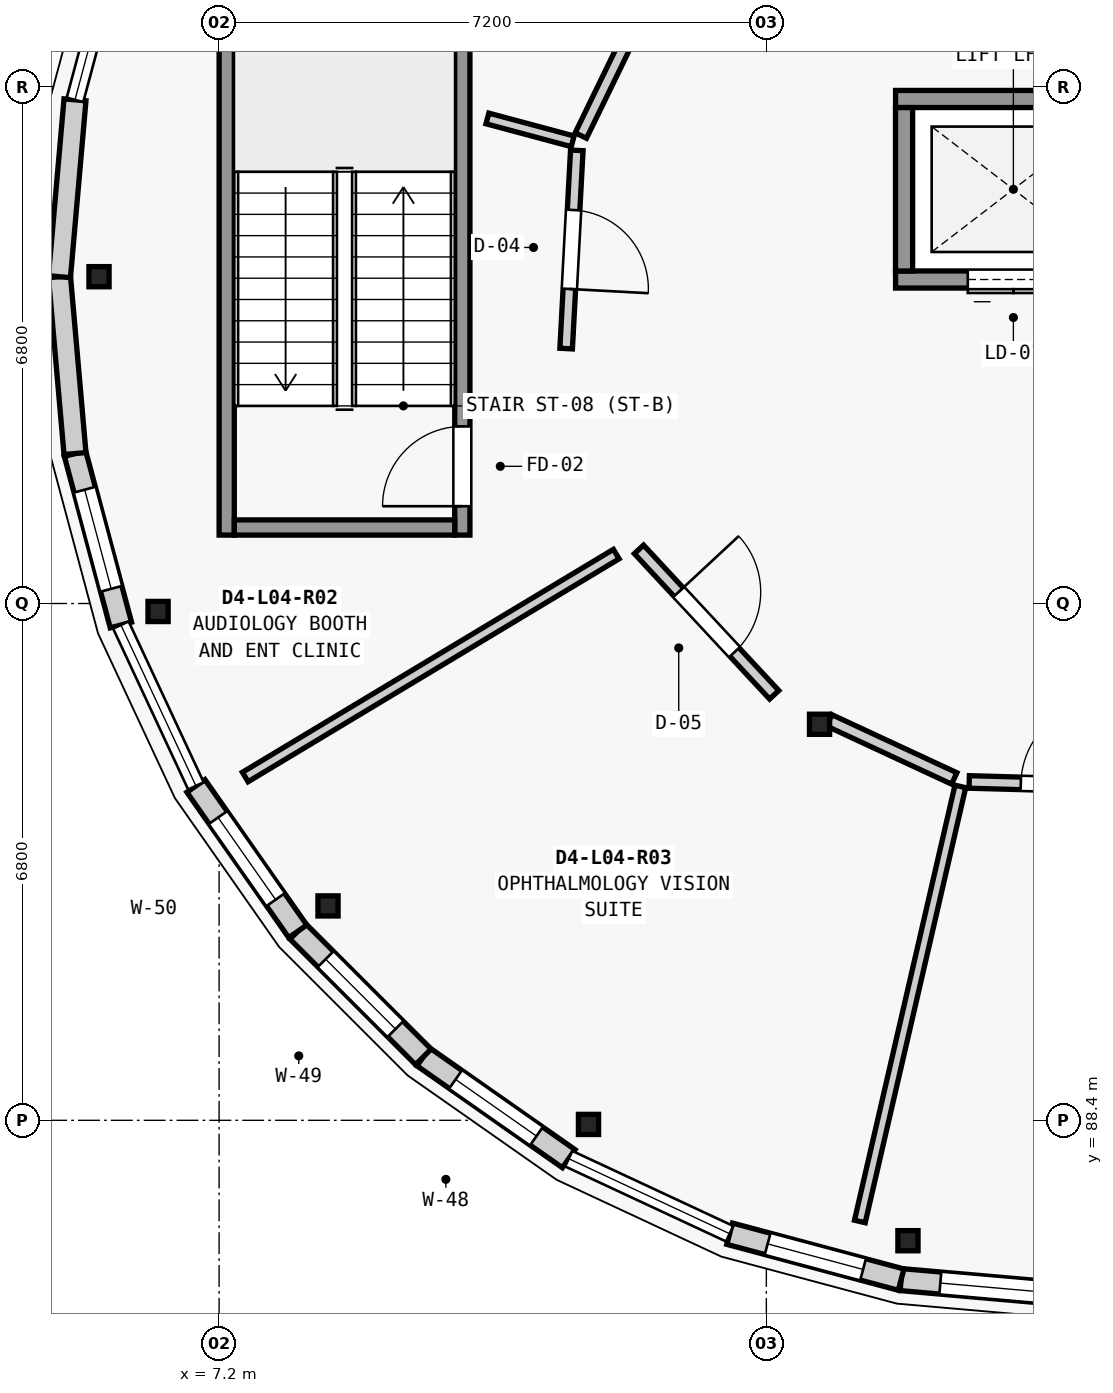
"""IFC4 building model, lengths in metres.
Left out: names, types, materials, properties, quantities, classifications, styles, units other than length and angle.
Written with IfcOpenShell. Run it as: python <this file> out.ifc"""

import sys

from ifc_helpers import new_model, si_unit, direction, frame, frame_2d, origin, origin_2d, place, context, subcontext, project, spatial, rectangle, extrude, element, fill, save


model = new_model("IFC4")
c1 = context("Model", 3, precision=1e-05, world=origin(), true_north=direction((0.0, 1.0)))
c2 = subcontext(c1, "Body", "Model", "MODEL_VIEW")
j1 = project(units=[si_unit("LENGTHUNIT", "METRE"), si_unit("PLANEANGLEUNIT", "RADIAN")], contexts=[c1])
p1 = place(None, origin())
s1 = spatial("IfcSite", under=j1, at=p1, CompositionType="ELEMENT")
p2 = place(p1, origin())
s2 = spatial("IfcBuilding", under=s1, at=p2, CompositionType="ELEMENT")
p3 = place(p2, frame((0.0, 0.0, 17.15)))
s3 = spatial("IfcBuildingStorey", under=s2, at=p3, CompositionType="ELEMENT", Elevation=17.15)
for number, where, z_axis, x_axis in (
    (1, (5.62, 99.5, 0.0), (0.0, 0.0, 1.0), (1.0, 0.0, 0.0)),
    (2, (6.397, 95.095, 0.0), (0.0, 0.0, 1.0), (1.0, 0.0, 0.0)),
    (3, (8.633, 91.221, 0.0), (0.0, 0.0, 1.0), (1.0, 0.0, 0.0)),
    (4, (12.06, 88.346, 0.0), (0.0, 0.0, 1.0), (1.0, 0.0, 0.0)),
    (5, (16.263, 86.816, 0.0), (0.0, 0.0, 1.0), (1.0, 0.0, 0.0)),
    (6, (15.1, 93.611, 0.0), (0.0, 0.0, 1.0), (1.0, 0.0, 0.0)),
):
    element("IfcColumn", number, at=place(p3, frame(where, z_axis=z_axis, x_axis=x_axis)), inside=s3, PredefinedType="COLUMN", context=c2, shape_type="SweptSolid", body=[
        extrude(rectangle(XDim=0.265, YDim=0.265, at=origin_2d()), origin(), (0.0, 0.0, 1.0), 4.2),
    ])
p4 = place(p3, frame((18.5, 86.1, 0.0), z_axis=(0.0, 0.0, 1.0), x_axis=(-0.996184295282, 0.087274565792, 0.0)))
e7 = element("IfcWall", 7, at=p4, inside=s3, PredefinedType="ELEMENTEDWALL", context=c2, shape_type="SweptSolid", body=[
    extrude(rectangle(XDim=2.336, YDim=0.29, at=frame_2d((1.168, 0.0))), origin(), (0.0, 0.0, 1.0), 3.369),
])
p5 = place(p4, frame((0.518, 0.0, 0.85)))
e8 = element("IfcOpeningElement", 8, at=p5, cuts=e7, PredefinedType="OPENING", context=c2, shape_type="SweptSolid", body=[
    extrude(rectangle(XDim=1.3, YDim=1.4, at=frame_2d((0.65, 0.7))), frame((0.0, 0.155, 0.0), z_axis=(0.0, -1.0, 0.0), x_axis=(1.0, 0.0, 0.0)), (0.0, 0.0, 1.0), 0.31),
])
p6 = place(p3, frame((16.173, 86.304, 0.0), z_axis=(0.0, 0.0, 1.0), x_axis=(-0.965981166673, 0.258612423585, 0.0)))
e9 = element("IfcWall", 9, at=p6, inside=s3, PredefinedType="ELEMENTEDWALL", context=c2, shape_type="SweptSolid", body=[
    extrude(rectangle(XDim=2.335, YDim=0.29, at=frame_2d((1.168, 0.0))), origin(), (0.0, 0.0, 1.0), 3.369),
])
p7 = place(p6, frame((0.518, 0.0, 0.85)))
e10 = element("IfcOpeningElement", 10, at=p7, cuts=e9, PredefinedType="OPENING", context=c2, shape_type="SweptSolid", body=[
    extrude(rectangle(XDim=1.3, YDim=1.7, at=frame_2d((0.65, 0.85))), frame((0.0, 0.155, 0.0), z_axis=(0.0, -1.0, 0.0), x_axis=(1.0, 0.0, 0.0)), (0.0, 0.0, 1.0), 0.31),
])
p8 = place(p3, frame((11.8, 87.895, 0.0), z_axis=(0.0, 0.0, 1.0), x_axis=(-0.819045278347, 0.573728883722, 0.0)))
e11 = element("IfcWall", 11, at=p8, inside=s3, PredefinedType="ELEMENTEDWALL", context=c2, shape_type="SweptSolid", body=[
    extrude(rectangle(XDim=2.336, YDim=0.29, at=frame_2d((1.168, 0.0))), origin(), (0.0, 0.0, 1.0), 3.369),
])
p9 = place(p8, frame((0.518, 0.0, 0.85)))
e12 = element("IfcOpeningElement", 12, at=p9, cuts=e11, PredefinedType="OPENING", context=c2, shape_type="SweptSolid", body=[
    extrude(rectangle(XDim=1.3, YDim=2.0, at=frame_2d((0.65, 1.0))), frame((0.0, 0.155, 0.0), z_axis=(0.0, -1.0, 0.0), x_axis=(1.0, 0.0, 0.0)), (0.0, 0.0, 1.0), 0.31),
])
p10 = place(p3, frame((9.887, 89.235, 0.0), z_axis=(0.0, 0.0, 1.0), x_axis=(-0.707106781187, 0.707106781187, 0.0)))
e13 = element("IfcWall", 13, at=p10, inside=s3, PredefinedType="ELEMENTEDWALL", context=c2, shape_type="SweptSolid", body=[
    extrude(rectangle(XDim=2.336, YDim=0.29, at=frame_2d((1.168, 0.0))), origin(), (0.0, 0.0, 1.0), 3.369),
])
p11 = place(p10, frame((0.518, 0.0, 0.85)))
e14 = element("IfcOpeningElement", 14, at=p11, cuts=e13, PredefinedType="OPENING", context=c2, shape_type="SweptSolid", body=[
    extrude(rectangle(XDim=1.3, YDim=2.3, at=frame_2d((0.65, 1.15))), frame((0.0, 0.155, 0.0), z_axis=(0.0, -1.0, 0.0), x_axis=(1.0, 0.0, 0.0)), (0.0, 0.0, 1.0), 0.31),
])
p12 = place(p3, frame((8.235, 90.887, 0.0), z_axis=(0.0, 0.0, 1.0), x_axis=(-0.573728883722, 0.819045278347, 0.0)))
e15 = element("IfcWall", 15, at=p12, inside=s3, PredefinedType="ELEMENTEDWALL", context=c2, shape_type="SweptSolid", body=[
    extrude(rectangle(XDim=2.336, YDim=0.29, at=frame_2d((1.168, 0.0))), origin(), (0.0, 0.0, 1.0), 3.369),
])
p13 = place(p12, frame((0.508, 0.0, 0.85)))
e16 = element("IfcOpeningElement", 16, at=p13, cuts=e15, PredefinedType="OPENING", context=c2, shape_type="SweptSolid", body=[
    extrude(rectangle(XDim=1.32, YDim=1.55, at=frame_2d((0.66, 0.775))), frame((0.0, 0.155, 0.0), z_axis=(0.0, -1.0, 0.0), x_axis=(1.0, 0.0, 0.0)), (0.0, 0.0, 1.0), 0.31),
])
p14 = place(p3, frame((5.908, 94.917, 0.0), z_axis=(0.0, 0.0, 1.0), x_axis=(-0.258612423585, 0.965981166673, 0.0)))
e17 = element("IfcWall", 17, at=p14, inside=s3, PredefinedType="ELEMENTEDWALL", context=c2, shape_type="SweptSolid", body=[
    extrude(rectangle(XDim=2.335, YDim=0.29, at=frame_2d((1.168, 0.0))), origin(), (0.0, 0.0, 1.0), 3.369),
])
p15 = place(p14, frame((0.493, 0.0, 0.85)))
e18 = element("IfcOpeningElement", 18, at=p15, cuts=e17, PredefinedType="OPENING", context=c2, shape_type="SweptSolid", body=[
    extrude(rectangle(XDim=1.35, YDim=1.55, at=frame_2d((0.675, 0.775))), frame((0.0, 0.155, 0.0), z_axis=(0.0, -1.0, 0.0), x_axis=(1.0, 0.0, 0.0)), (0.0, 0.0, 1.0), 0.31),
])
for number, where, z_axis, x_axis in (
    (19, (5.304, 97.173, 0.0), (0.0, 0.0, 1.0), (-0.087, 0.996, 0.0)),
    (20, (5.1, 99.5, 0.0), (0.0, 0.0, 1.0), (0.087, 0.996, 0.0)),
):
    element("IfcWall", number, at=place(p3, frame(where, z_axis=z_axis, x_axis=x_axis)), inside=s3, PredefinedType="ELEMENTEDWALL", context=c2, shape_type="SweptSolid", body=[
        extrude(rectangle(XDim=2.336, YDim=0.29, at=frame_2d((1.168, 0.0))), origin(), (0.0, 0.0, 1.0), 3.369),
    ])
p16 = place(p3, frame((10.4, 96.1, 0.0), z_axis=(0.0, 0.0, 1.0), x_axis=(0.0, 1.0, 0.0)))
e21 = element("IfcWall", 21, at=p16, inside=s3, PredefinedType="SHEAR", context=c2, shape_type="SweptSolid", body=[
    extrude(rectangle(XDim=6.8, YDim=0.2, at=frame_2d((3.4, 0.0))), origin(), (0.0, 0.0, 1.0), 4.015),
])
p17 = place(p16, frame((0.38, 0.0, 0.0)))
e22 = element("IfcOpeningElement", 22, at=p17, cuts=e21, PredefinedType="OPENING", context=c2, shape_type="SweptSolid", body=[
    extrude(rectangle(XDim=1.05, YDim=2.15, at=frame_2d((0.525, 1.075))), frame((0.0, 0.11, 0.0), z_axis=(0.0, -1.0, 0.0), x_axis=(1.0, 0.0, 0.0)), (0.0, 0.0, 1.0), 0.22),
])
p18 = place(p3, frame((7.3, 96.1, 0.0), z_axis=(0.0, 0.0, 1.0), x_axis=(0.0, 1.0, 0.0)))
e23 = element("IfcWall", 23, at=p18, inside=s3, PredefinedType="SHEAR", context=c2, shape_type="SweptSolid", body=[
    extrude(rectangle(XDim=6.8, YDim=0.2, at=frame_2d((3.4, 0.0))), origin(), (0.0, 0.0, 1.0), 4.015),
])
p19 = place(p3, frame((10.3, 96.2, 0.0), z_axis=(0.0, 0.0, 1.0), x_axis=(-1.0, 0.0, 0.0)))
e24 = element("IfcWall", 24, at=p19, inside=s3, PredefinedType="SHEAR", context=c2, shape_type="SweptSolid", body=[
    extrude(rectangle(XDim=2.9, YDim=0.2, at=frame_2d((1.45, 0.0))), origin(), (0.0, 0.0, 1.0), 4.015),
])
p20 = place(p3, frame((16.1, 99.463, 0.0), z_axis=(0.0, 0.0, 1.0), x_axis=(1.0, 0.0, 0.0)))
e25 = element("IfcWall", 25, at=p20, inside=s3, PredefinedType="SHEAR", context=c2, shape_type="SweptSolid", body=[
    extrude(rectangle(XDim=3.1, YDim=0.225, at=frame_2d((1.55, 0.0))), origin(), (0.0, 0.0, 1.0), 4.015),
])
p21 = place(p20, frame((0.95, 0.0, 0.0)))
e26 = element("IfcOpeningElement", 26, at=p21, cuts=e25, PredefinedType="OPENING", context=c2, shape_type="SweptSolid", body=[
    extrude(rectangle(XDim=1.2, YDim=2.2, at=frame_2d((0.6, 1.1))), frame((0.0, 0.123, 0.0), z_axis=(0.0, -1.0, 0.0), x_axis=(1.0, 0.0, 0.0)), (0.0, 0.0, 1.0), 0.245),
])
p22 = place(p3, frame((16.1, 101.838, 0.0), z_axis=(0.0, 0.0, 1.0), x_axis=(1.0, 0.0, 0.0)))
e27 = element("IfcWall", 27, at=p22, inside=s3, PredefinedType="SHEAR", context=c2, shape_type="SweptSolid", body=[
    extrude(rectangle(XDim=3.1, YDim=0.225, at=frame_2d((1.55, 0.0))), origin(), (0.0, 0.0, 1.0), 4.015),
])
p23 = place(p3, frame((16.212, 99.575, 0.0), z_axis=(0.0, 0.0, 1.0), x_axis=(0.0, 1.0, 0.0)))
e28 = element("IfcWall", 28, at=p23, inside=s3, PredefinedType="SHEAR", context=c2, shape_type="SweptSolid", body=[
    extrude(rectangle(XDim=2.15, YDim=0.225, at=frame_2d((1.075, 0.0))), origin(), (0.0, 0.0, 1.0), 4.015),
])
p24 = place(p3, frame((11.852, 101.281, 0.0), z_axis=(0.0, 0.0, 1.0), x_axis=(-0.965846685591, 0.259114221787, 0.0)))
e29 = element("IfcWall", 29, at=p24, inside=s3, PredefinedType="PARTITIONING", context=c2, shape_type="SweptSolid", body=[
    extrude(rectangle(XDim=1.162, YDim=0.145, at=frame_2d((0.581, 0.0))), origin(), (0.0, 0.0, 1.0), 3.344),
])
p25 = place(p3, frame((12.425, 95.85, 0.0), z_axis=(0.0, 0.0, 1.0), x_axis=(-0.857148493381, -0.515069374255, 0.0)))
e30 = element("IfcWall", 30, at=p25, inside=s3, PredefinedType="PARTITIONING", context=c2, shape_type="SweptSolid", body=[
    extrude(rectangle(XDim=5.695, YDim=0.145, at=frame_2d((2.847, 0.0))), origin(), (0.0, 0.0, 1.0), 3.344),
])
p26 = place(p3, frame((16.952, 92.793, 0.0), z_axis=(0.0, 0.0, 1.0), x_axis=(-0.225041614944, -0.97434915279, 0.0)))
e31 = element("IfcWall", 31, at=p26, inside=s3, PredefinedType="PARTITIONING", context=c2, shape_type="SweptSolid", body=[
    extrude(rectangle(XDim=5.875, YDim=0.145, at=frame_2d((2.937, 0.0))), origin(), (0.0, 0.0, 1.0), 3.344),
])
p27 = place(p3, frame((12.999, 103.497, 0.0), z_axis=(0.0, 0.0, 1.0), x_axis=(-0.437088964267, -0.899418277175, 0.0)))
e32 = element("IfcWall", 32, at=p27, inside=s3, PredefinedType="PARTITIONING", context=c2, shape_type="SweptSolid", body=[
    extrude(rectangle(XDim=2.379, YDim=0.165, at=frame_2d((1.19, 0.0))), origin(), (0.0, 0.0, 1.0), 3.344),
])
p28 = place(p3, frame((11.906, 101.162, 0.0), z_axis=(0.0, 0.0, 1.0), x_axis=(-0.053559631757, -0.998564652812, 0.0)))
e33 = element("IfcWall", 33, at=p28, inside=s3, PredefinedType="PARTITIONING", context=c2, shape_type="SweptSolid", body=[
    extrude(rectangle(XDim=2.612, YDim=0.165, at=frame_2d((1.306, 0.0))), origin(), (0.0, 0.0, 1.0), 3.344),
])
p29 = place(p28, frame((0.786, 0.0, 0.0)))
e34 = element("IfcOpeningElement", 34, at=p29, cuts=e33, PredefinedType="OPENING", context=c2, shape_type="SweptSolid", body=[
    extrude(rectangle(XDim=1.04, YDim=2.14, at=frame_2d((0.52, 1.07))), frame((0.0, 0.093, 0.0), z_axis=(0.0, -1.0, 0.0), x_axis=(1.0, 0.0, 0.0)), (0.0, 0.0, 1.0), 0.185),
])
p30 = place(p3, frame((12.724, 95.912, 0.0), z_axis=(0.0, 0.0, 1.0), x_axis=(0.680938469168, -0.732340631952, 0.0)))
e35 = element("IfcWall", 35, at=p30, inside=s3, PredefinedType="PARTITIONING", context=c2, shape_type="SweptSolid", body=[
    extrude(rectangle(XDim=2.612, YDim=0.165, at=frame_2d((1.306, 0.0))), origin(), (0.0, 0.0, 1.0), 3.344),
])
p31 = place(p30, frame((0.766, 0.0, 0.0)))
e36 = element("IfcOpeningElement", 36, at=p31, cuts=e35, PredefinedType="OPENING", context=c2, shape_type="SweptSolid", body=[
    extrude(rectangle(XDim=1.08, YDim=2.16, at=frame_2d((0.54, 1.08))), frame((0.0, 0.093, 0.0), z_axis=(0.0, -1.0, 0.0), x_axis=(1.0, 0.0, 0.0)), (0.0, 0.0, 1.0), 0.185),
])
p32 = place(p3, frame((15.228, 93.662, 0.0), z_axis=(0.0, 0.0, 1.0), x_axis=(0.906828861557, -0.421499010495, 0.0)))
e37 = element("IfcWall", 37, at=p32, inside=s3, PredefinedType="PARTITIONING", context=c2, shape_type="SweptSolid", body=[
    extrude(rectangle(XDim=1.813, YDim=0.165, at=frame_2d((0.906, 0.0))), origin(), (0.0, 0.0, 1.0), 3.344),
])
p33 = place(p3, frame((17.069, 92.852, 0.0), z_axis=(0.0, 0.0, 1.0), x_axis=(0.999621757445, -0.027501673437, 0.0)))
e38 = element("IfcWall", 38, at=p33, inside=s3, PredefinedType="PARTITIONING", context=c2, shape_type="SweptSolid", body=[
    extrude(rectangle(XDim=2.477, YDim=0.165, at=frame_2d((1.238, 0.0))), origin(), (0.0, 0.0, 1.0), 3.344),
])
p34 = place(p33, frame((0.679, 0.0, 0.0)))
e39 = element("IfcOpeningElement", 39, at=p34, cuts=e38, PredefinedType="OPENING", context=c2, shape_type="SweptSolid", body=[
    extrude(rectangle(XDim=1.12, YDim=2.16, at=frame_2d((0.56, 1.08))), frame((0.0, 0.093, 0.0), z_axis=(0.0, -1.0, 0.0), x_axis=(1.0, 0.0, 0.0)), (0.0, 0.0, 1.0), 0.185),
])
p35 = place(p5, origin())
e40 = element("IfcWindow", 40, at=p35, inside=s3, PartitioningType="SINGLE_PANEL", PredefinedType="WINDOW", context=c2, shape_type="SweptSolid", body=[
    extrude(rectangle(XDim=1.3, YDim=1.4, at=frame_2d((0.65, 0.7))), frame((0.0, 0.03, 0.0), z_axis=(0.0, -1.0, 0.0), x_axis=(1.0, 0.0, 0.0)), (0.0, 0.0, 1.0), 0.06),
])
fill(e8, e40)
p36 = place(p7, origin())
e41 = element("IfcWindow", 41, at=p36, inside=s3, PartitioningType="SINGLE_PANEL", PredefinedType="WINDOW", context=c2, shape_type="SweptSolid", body=[
    extrude(rectangle(XDim=1.3, YDim=1.7, at=frame_2d((0.65, 0.85))), frame((0.0, 0.03, 0.0), z_axis=(0.0, -1.0, 0.0), x_axis=(1.0, 0.0, 0.0)), (0.0, 0.0, 1.0), 0.06),
])
fill(e10, e41)
p37 = place(p9, origin())
e42 = element("IfcWindow", 42, at=p37, inside=s3, PartitioningType="SINGLE_PANEL", PredefinedType="WINDOW", context=c2, shape_type="SweptSolid", body=[
    extrude(rectangle(XDim=1.3, YDim=2.0, at=frame_2d((0.65, 1.0))), frame((0.0, 0.03, 0.0), z_axis=(0.0, -1.0, 0.0), x_axis=(1.0, 0.0, 0.0)), (0.0, 0.0, 1.0), 0.06),
])
fill(e12, e42)
p38 = place(p11, origin())
e43 = element("IfcWindow", 43, at=p38, inside=s3, PartitioningType="SINGLE_PANEL", PredefinedType="WINDOW", context=c2, shape_type="SweptSolid", body=[
    extrude(rectangle(XDim=1.3, YDim=2.3, at=frame_2d((0.65, 1.15))), frame((0.0, 0.03, 0.0), z_axis=(0.0, -1.0, 0.0), x_axis=(1.0, 0.0, 0.0)), (0.0, 0.0, 1.0), 0.06),
])
fill(e14, e43)
p39 = place(p13, origin())
e44 = element("IfcWindow", 44, at=p39, inside=s3, PartitioningType="SINGLE_PANEL", PredefinedType="WINDOW", context=c2, shape_type="SweptSolid", body=[
    extrude(rectangle(XDim=1.32, YDim=1.55, at=frame_2d((0.66, 0.775))), frame((0.0, 0.03, 0.0), z_axis=(0.0, -1.0, 0.0), x_axis=(1.0, 0.0, 0.0)), (0.0, 0.0, 1.0), 0.06),
])
fill(e16, e44)
p40 = place(p15, origin())
e45 = element("IfcWindow", 45, at=p40, inside=s3, PartitioningType="SINGLE_PANEL", PredefinedType="WINDOW", context=c2, shape_type="SweptSolid", body=[
    extrude(rectangle(XDim=1.35, YDim=1.55, at=frame_2d((0.675, 0.775))), frame((0.0, 0.03, 0.0), z_axis=(0.0, -1.0, 0.0), x_axis=(1.0, 0.0, 0.0)), (0.0, 0.0, 1.0), 0.06),
])
fill(e18, e45)
p41 = place(p17, origin())
e46 = element("IfcDoor", 46, at=p41, inside=s3, OperationType="SINGLE_SWING_LEFT", PredefinedType="DOOR", context=c2, shape_type="SweptSolid", body=[
    extrude(rectangle(XDim=1.05, YDim=2.15, at=frame_2d((0.525, 1.075))), frame((0.0, 0.025, 0.0), z_axis=(0.0, -1.0, 0.0), x_axis=(1.0, 0.0, 0.0)), (0.0, 0.0, 1.0), 0.05),
])
fill(e22, e46)
p42 = place(p21, origin())
e47 = element("IfcDoor", 47, at=p42, inside=s3, OperationType="DOUBLE_DOOR_SLIDING", PredefinedType="DOOR", context=c2, shape_type="SweptSolid", body=[
    extrude(rectangle(XDim=1.2, YDim=2.2, at=frame_2d((0.6, 1.1))), frame((0.0, 0.025, 0.0), z_axis=(0.0, -1.0, 0.0), x_axis=(1.0, 0.0, 0.0)), (0.0, 0.0, 1.0), 0.05),
])
fill(e26, e47)
p43 = place(p29, origin())
e48 = element("IfcDoor", 48, at=p43, inside=s3, OperationType="SINGLE_SWING_RIGHT", PredefinedType="DOOR", context=c2, shape_type="SweptSolid", body=[
    extrude(rectangle(XDim=1.04, YDim=2.14, at=frame_2d((0.52, 1.07))), frame((0.0, 0.025, 0.0), z_axis=(0.0, -1.0, 0.0), x_axis=(1.0, 0.0, 0.0)), (0.0, 0.0, 1.0), 0.05),
])
fill(e34, e48)
p44 = place(p31, origin())
e49 = element("IfcDoor", 49, at=p44, inside=s3, OperationType="SINGLE_SWING_LEFT", PredefinedType="DOOR", context=c2, shape_type="SweptSolid", body=[
    extrude(rectangle(XDim=1.08, YDim=2.16, at=frame_2d((0.54, 1.08))), frame((0.0, 0.025, 0.0), z_axis=(0.0, -1.0, 0.0), x_axis=(1.0, 0.0, 0.0)), (0.0, 0.0, 1.0), 0.05),
])
fill(e36, e49)
p45 = place(p34, origin())
e50 = element("IfcDoor", 50, at=p45, inside=s3, OperationType="SINGLE_SWING_RIGHT", PredefinedType="DOOR", context=c2, shape_type="SweptSolid", body=[
    extrude(rectangle(XDim=1.12, YDim=2.16, at=frame_2d((0.56, 1.08))), frame((0.0, 0.025, 0.0), z_axis=(0.0, -1.0, 0.0), x_axis=(1.0, 0.0, 0.0)), (0.0, 0.0, 1.0), 0.05),
])
fill(e39, e50)
save(model, sys.argv[1])
